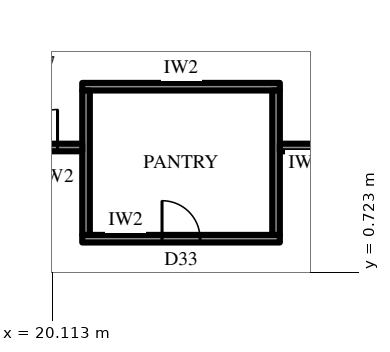
"""IFC4 building model, lengths in metres.
Left out: names, types, materials, properties, quantities, classifications, styles, units other than length and angle.
Written with IfcOpenShell. Run it as: python <this file> out.ifc"""

import sys

from ifc_helpers import new_model, si_unit, direction, frame, frame_2d, origin, place, context, subcontext, project, spatial, rectangle, extrude, element, fill, save


model = new_model("IFC4")
c1 = context("Model", 3, precision=1e-05, world=origin(), true_north=direction((0.0, 1.0)))
c2 = subcontext(c1, "Body", "Model", "MODEL_VIEW")
j1 = project(units=[si_unit("LENGTHUNIT", "METRE"), si_unit("PLANEANGLEUNIT", "RADIAN")], contexts=[c1])
p1 = place(None, origin())
s1 = spatial("IfcSite", under=j1, at=p1, CompositionType="ELEMENT")
p2 = place(p1, origin())
s2 = spatial("IfcBuilding", under=s1, at=p2, CompositionType="ELEMENT")
p3 = place(p2, frame((0.0, 0.0, 123.7)))
s3 = spatial("IfcBuildingStorey", under=s2, at=p3, CompositionType="ELEMENT", Elevation=123.7)
p4 = place(p3, frame((20.9, 1.6, 0.0), z_axis=(0.0, 0.0, 1.0), x_axis=(1.0, 0.0, 0.0)))
e1 = element("IfcWall", 1, at=p4, inside=s3, PredefinedType="PARTITIONING", context=c2, shape_type="SweptSolid", body=[
    extrude(rectangle(XDim=5.2, YDim=0.2, at=frame_2d((2.6, 0.0))), origin(), (0.0, 0.0, 1.0), 4.0),
])
p5 = place(p4, frame((2.1, 0.0, 0.0)))
e2 = element("IfcOpeningElement", 2, at=p5, cuts=e1, PredefinedType="OPENING", context=c2, shape_type="SweptSolid", body=[
    extrude(rectangle(XDim=1.0, YDim=2.2, at=frame_2d((0.5, 1.1))), frame((0.0, 0.11, 0.0), z_axis=(0.0, -1.0, 0.0), x_axis=(1.0, 0.0, 0.0)), (0.0, 0.0, 1.0), 0.22),
])
p6 = place(p3, frame((20.9, 5.6, 0.0), z_axis=(0.0, 0.0, 1.0), x_axis=(1.0, 0.0, 0.0)))
e3 = element("IfcWall", 3, at=p6, inside=s3, PredefinedType="PARTITIONING", context=c2, shape_type="SweptSolid", body=[
    extrude(rectangle(XDim=5.2, YDim=0.2, at=frame_2d((2.6, 0.0))), origin(), (0.0, 0.0, 1.0), 4.0),
])
for number, where, z_axis, x_axis in (
    (4, (21.0, 1.7, 0.0), (0.0, 0.0, 1.0), (0.0, 1.0, 0.0)),
    (5, (26.0, 1.7, 0.0), (0.0, 0.0, 1.0), (0.0, 1.0, 0.0)),
):
    element("IfcWall", number, at=place(p3, frame(where, z_axis=z_axis, x_axis=x_axis)), inside=s3, PredefinedType="PARTITIONING", context=c2, shape_type="SweptSolid", body=[
        extrude(rectangle(XDim=3.8, YDim=0.2, at=frame_2d((1.9, 0.0))), origin(), (0.0, 0.0, 1.0), 4.0),
    ])
p7 = place(p3, frame((18.6, 4.0, 0.0), z_axis=(0.0, 0.0, 1.0), x_axis=(1.0, 0.0, 0.0)))
e6 = element("IfcWall", 6, at=p7, inside=s3, PredefinedType="PARTITIONING", context=c2, shape_type="SweptSolid", body=[
    extrude(rectangle(XDim=2.3, YDim=0.2, at=frame_2d((1.15, 0.0))), origin(), (0.0, 0.0, 1.0), 4.0),
])
p8 = place(p7, frame((0.65, 0.0, 0.0)))
e7 = element("IfcOpeningElement", 7, at=p8, cuts=e6, PredefinedType="OPENING", context=c2, shape_type="SweptSolid", body=[
    extrude(rectangle(XDim=1.0, YDim=2.2, at=frame_2d((0.5, 1.1))), frame((0.0, 0.11, 0.0), z_axis=(0.0, -1.0, 0.0), x_axis=(1.0, 0.0, 0.0)), (0.0, 0.0, 1.0), 0.22),
])
p9 = place(p3, frame((26.1, 4.0, 0.0), z_axis=(0.0, 0.0, 1.0), x_axis=(1.0, 0.0, 0.0)))
e8 = element("IfcWall", 8, at=p9, inside=s3, PredefinedType="PARTITIONING", context=c2, shape_type="SweptSolid", body=[
    extrude(rectangle(XDim=7.709, YDim=0.2, at=frame_2d((3.855, 0.0))), origin(), (0.0, 0.0, 1.0), 4.0),
])
p10 = place(p5, origin())
e9 = element("IfcDoor", 9, at=p10, inside=s3, OperationType="SINGLE_SWING_RIGHT", PredefinedType="DOOR", context=c2, shape_type="SweptSolid", body=[
    extrude(rectangle(XDim=1.0, YDim=2.2, at=frame_2d((0.5, 1.1))), frame((0.0, 0.025, 0.0), z_axis=(0.0, -1.0, 0.0), x_axis=(1.0, 0.0, 0.0)), (0.0, 0.0, 1.0), 0.05),
])
fill(e2, e9)
p11 = place(p8, origin())
e10 = element("IfcDoor", 10, at=p11, inside=s3, OperationType="SINGLE_SWING_LEFT", PredefinedType="DOOR", context=c2, shape_type="SweptSolid", body=[
    extrude(rectangle(XDim=1.0, YDim=2.2, at=frame_2d((0.5, 1.1))), frame((0.0, 0.025, 0.0), z_axis=(0.0, -1.0, 0.0), x_axis=(1.0, 0.0, 0.0)), (0.0, 0.0, 1.0), 0.05),
])
fill(e7, e10)
save(model, sys.argv[1])
